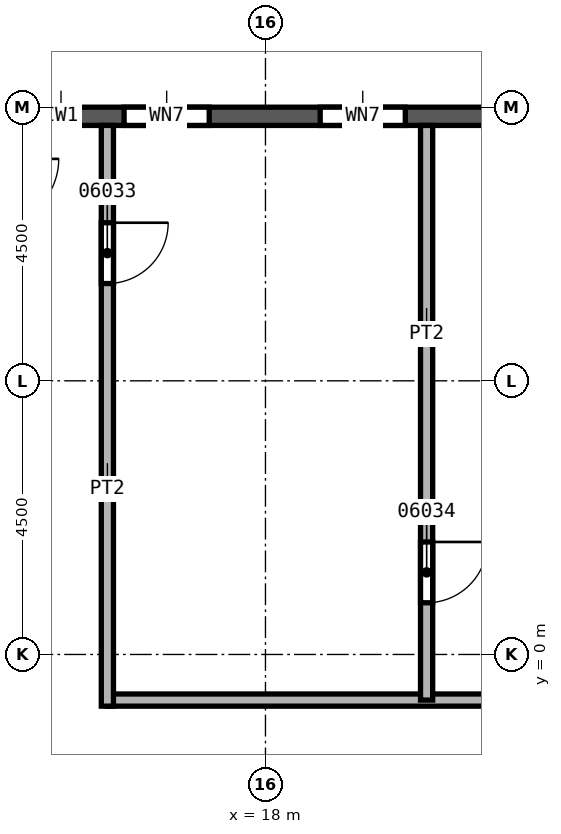
"""IFC4 building model, lengths in metres.
Left out: names, types, materials, properties, quantities, classifications, styles, units other than length and angle.
Written with IfcOpenShell. Run it as: python <this file> out.ifc"""

import sys

from ifc_helpers import new_model, si_unit, direction, frame, frame_2d, origin, place, context, subcontext, project, spatial, rectangle, extrude, element, fill, save


model = new_model("IFC4")
c1 = context("Model", 3, precision=1e-05, world=origin(), true_north=direction((0.0, 1.0)))
c2 = subcontext(c1, "Body", "Model", "MODEL_VIEW")
j1 = project(units=[si_unit("LENGTHUNIT", "METRE"), si_unit("PLANEANGLEUNIT", "RADIAN")], contexts=[c1])
p1 = place(None, origin())
s1 = spatial("IfcSite", under=j1, at=p1, CompositionType="ELEMENT")
p2 = place(p1, origin())
s2 = spatial("IfcBuilding", under=s1, at=p2, CompositionType="ELEMENT")
p3 = place(p2, frame((0.0, 0.0, 126.0)))
s3 = spatial("IfcBuildingStorey", under=s2, at=p3, CompositionType="ELEMENT", Elevation=126.0)
p4 = place(p3, frame((21.95, 8.85, 0.0), z_axis=(0.0, 0.0, 1.0), x_axis=(-1.0, 0.0, 0.0)))
e1 = element("IfcWall", 1, at=p4, inside=s3, PredefinedType="SOLIDWALL", context=c2, shape_type="SweptSolid", body=[
    extrude(rectangle(XDim=8.4, YDim=0.3, at=frame_2d((4.2, 0.0))), origin(), (0.0, 0.0, 1.0), 3.1),
])
p5 = place(p4, frame((1.65, 0.0, 0.8)))
e2 = element("IfcOpeningElement", 2, at=p5, cuts=e1, PredefinedType="OPENING", context=c2, shape_type="SweptSolid", body=[
    extrude(rectangle(XDim=1.4, YDim=1.95, at=frame_2d((0.7, 0.975))), frame((0.0, 0.15, 0.0), z_axis=(0.0, -1.0, 0.0), x_axis=(1.0, 0.0, 0.0)), (0.0, 0.0, 1.0), 0.3),
])
p6 = place(p4, frame((4.875, 0.0, 0.8)))
e3 = element("IfcOpeningElement", 3, at=p6, cuts=e1, PredefinedType="OPENING", context=c2, shape_type="SweptSolid", body=[
    extrude(rectangle(XDim=1.4, YDim=1.95, at=frame_2d((0.7, 0.975))), frame((0.0, 0.15, 0.0), z_axis=(0.0, -1.0, 0.0), x_axis=(1.0, 0.0, 0.0)), (0.0, 0.0, 1.0), 0.3),
])
p7 = place(p3, frame((15.4, -0.75, 0.0), z_axis=(0.0, 0.0, 1.0), x_axis=(1.0, 0.0, 0.0)))
e4 = element("IfcWall", 4, at=p7, inside=s3, PredefinedType="PARTITIONING", context=c2, shape_type="SweptSolid", body=[
    extrude(rectangle(XDim=18.45, YDim=0.2, at=frame_2d((9.225, 0.0))), origin(), (0.0, 0.0, 1.0), 3.7),
])
p8 = place(p7, frame((14.9, 0.0, 0.0)))
e5 = element("IfcOpeningElement", 5, at=p8, cuts=e4, PredefinedType="OPENING", context=c2, shape_type="SweptSolid", body=[
    extrude(rectangle(XDim=1.0, YDim=2.1, at=frame_2d((0.5, 1.05))), frame((0.0, 0.1, 0.0), z_axis=(0.0, -1.0, 0.0), x_axis=(1.0, 0.0, 0.0)), (0.0, 0.0, 1.0), 0.2),
])
p9 = place(p3, frame((15.4, 8.7, 0.0), z_axis=(0.0, 0.0, 1.0), x_axis=(0.0, -1.0, 0.0)))
e6 = element("IfcWall", 6, at=p9, inside=s3, PredefinedType="PARTITIONING", context=c2, shape_type="SweptSolid", body=[
    extrude(rectangle(XDim=9.55, YDim=0.2, at=frame_2d((4.775, 0.0))), origin(), (0.0, 0.0, 1.0), 3.7),
])
p10 = place(p9, frame((1.6, 0.0, 0.0)))
e7 = element("IfcOpeningElement", 7, at=p10, cuts=e6, PredefinedType="OPENING", context=c2, shape_type="SweptSolid", body=[
    extrude(rectangle(XDim=1.0, YDim=2.1, at=frame_2d((0.5, 1.05))), frame((0.0, 0.1, 0.0), z_axis=(0.0, -1.0, 0.0), x_axis=(1.0, 0.0, 0.0)), (0.0, 0.0, 1.0), 0.2),
])
p11 = place(p3, frame((20.65, 8.7, 0.0), z_axis=(0.0, 0.0, 1.0), x_axis=(0.0, -1.0, 0.0)))
e8 = element("IfcWall", 8, at=p11, inside=s3, PredefinedType="PARTITIONING", context=c2, shape_type="SweptSolid", body=[
    extrude(rectangle(XDim=9.45, YDim=0.2, at=frame_2d((4.725, 0.0))), origin(), (0.0, 0.0, 1.0), 3.7),
])
p12 = place(p11, frame((6.85, 0.0, 0.0)))
e9 = element("IfcOpeningElement", 9, at=p12, cuts=e8, PredefinedType="OPENING", context=c2, shape_type="SweptSolid", body=[
    extrude(rectangle(XDim=1.0, YDim=2.1, at=frame_2d((0.5, 1.05))), frame((0.0, 0.1, 0.0), z_axis=(0.0, -1.0, 0.0), x_axis=(1.0, 0.0, 0.0)), (0.0, 0.0, 1.0), 0.2),
])
p13 = place(p10, origin())
e10 = element("IfcDoor", 10, at=p13, inside=s3, OperationType="SINGLE_SWING_RIGHT", PredefinedType="DOOR", context=c2, shape_type="SweptSolid", body=[
    extrude(rectangle(XDim=1.0, YDim=2.1, at=frame_2d((0.5, 1.05))), frame((0.0, 0.025, 0.0), z_axis=(0.0, -1.0, 0.0), x_axis=(1.0, 0.0, 0.0)), (0.0, 0.0, 1.0), 0.05),
])
fill(e7, e10)
p14 = place(p12, origin())
e11 = element("IfcDoor", 11, at=p14, inside=s3, OperationType="SINGLE_SWING_LEFT", PredefinedType="DOOR", context=c2, shape_type="SweptSolid", body=[
    extrude(rectangle(XDim=1.0, YDim=2.1, at=frame_2d((0.5, 1.05))), frame((0.0, 0.025, 0.0), z_axis=(0.0, -1.0, 0.0), x_axis=(1.0, 0.0, 0.0)), (0.0, 0.0, 1.0), 0.05),
])
fill(e9, e11)
p15 = place(p5, origin())
e12 = element("IfcWindow", 12, at=p15, inside=s3, PartitioningType="SINGLE_PANEL", PredefinedType="WINDOW", context=c2, shape_type="SweptSolid", body=[
    extrude(rectangle(XDim=1.4, YDim=1.95, at=frame_2d((0.7, 0.975))), frame((0.0, 0.03, 0.0), z_axis=(0.0, -1.0, 0.0), x_axis=(1.0, 0.0, 0.0)), (0.0, 0.0, 1.0), 0.06),
])
fill(e2, e12)
p16 = place(p6, origin())
e13 = element("IfcWindow", 13, at=p16, inside=s3, PartitioningType="SINGLE_PANEL", PredefinedType="WINDOW", context=c2, shape_type="SweptSolid", body=[
    extrude(rectangle(XDim=1.4, YDim=1.95, at=frame_2d((0.7, 0.975))), frame((0.0, 0.03, 0.0), z_axis=(0.0, -1.0, 0.0), x_axis=(1.0, 0.0, 0.0)), (0.0, 0.0, 1.0), 0.06),
])
fill(e3, e13)
save(model, sys.argv[1])
